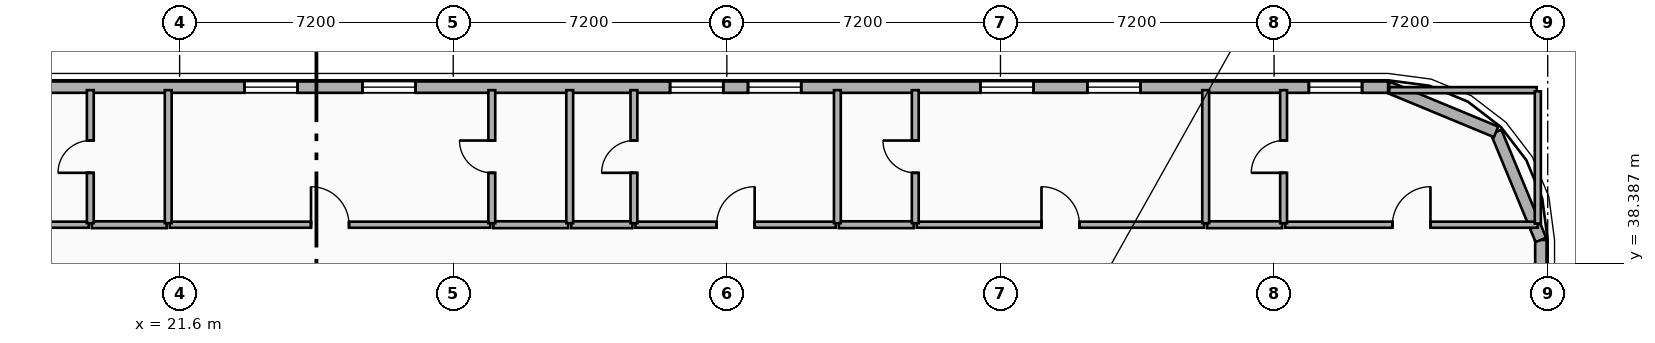
"""IFC4 building model, lengths in metres.
Left out: names, types, materials, properties, quantities, classifications, styles, units other than length and angle.
Written with IfcOpenShell. Run it as: python <this file> out.ifc"""

import sys

from ifc_helpers import new_model, si_unit, direction, frame, frame_2d, origin, place, context, subcontext, project, spatial, rectangle, extrude, element, fill, save


model = new_model("IFC4")
c1 = context("Model", 3, precision=1e-05, world=origin(), true_north=direction((0.0, 1.0)))
c2 = subcontext(c1, "Body", "Model", "MODEL_VIEW")
j1 = project(units=[si_unit("LENGTHUNIT", "METRE"), si_unit("PLANEANGLEUNIT", "RADIAN")], contexts=[c1])
p1 = place(None, origin())
s1 = spatial("IfcSite", under=j1, at=p1, CompositionType="ELEMENT")
p2 = place(p1, origin())
s2 = spatial("IfcBuilding", under=s1, at=p2, CompositionType="ELEMENT")
p3 = place(p2, frame((0.0, 0.0, 86.3)))
s3 = spatial("IfcBuildingStorey", under=s2, at=p3, CompositionType="ELEMENT", Elevation=86.3)
p4 = place(p3, frame((57.42, 39.0, 0.0), z_axis=(0.0, 0.0, 1.0), x_axis=(0.0, -1.0, 0.0)))
e1 = element("IfcWall", 1, at=p4, inside=s3, PredefinedType="SOLIDWALL", context=c2, shape_type="SweptSolid", body=[
    extrude(rectangle(XDim=18.0, YDim=0.3, at=frame_2d((9.0, 0.0))), origin(), (0.0, 0.0, 1.0), 3.24),
])
p5 = place(p4, frame((8.882, 0.0, 0.48)))
e2 = element("IfcOpeningElement", 2, at=p5, cuts=e1, PredefinedType="OPENING", context=c2, shape_type="SweptSolid", body=[
    extrude(rectangle(XDim=1.4, YDim=1.8, at=frame_2d((0.7, 0.9))), frame((0.0, 0.16, 0.0), z_axis=(0.0, -1.0, 0.0), x_axis=(1.0, 0.0, 0.0)), (0.0, 0.0, 1.0), 0.32),
])
p6 = place(p4, frame((3.621, 0.0, 0.48)))
e3 = element("IfcOpeningElement", 3, at=p6, cuts=e1, PredefinedType="OPENING", context=c2, shape_type="SweptSolid", body=[
    extrude(rectangle(XDim=1.4, YDim=1.8, at=frame_2d((0.7, 0.9))), frame((0.0, 0.16, 0.0), z_axis=(0.0, -1.0, 0.0), x_axis=(1.0, 0.0, 0.0)), (0.0, 0.0, 1.0), 0.32),
])
p7 = place(p4, frame((16.28, 0.0, 0.65)))
e4 = element("IfcOpeningElement", 4, at=p7, cuts=e1, PredefinedType="OPENING", context=c2, shape_type="SweptSolid", body=[
    extrude(rectangle(XDim=1.4, YDim=1.8, at=frame_2d((0.7, 0.9))), frame((0.0, 0.16, 0.0), z_axis=(0.0, -1.0, 0.0), x_axis=(1.0, 0.0, 0.0)), (0.0, 0.0, 1.0), 0.32),
])
p8 = place(p3, frame((56.243, 41.843, 0.0), z_axis=(0.0, 0.0, 1.0), x_axis=(0.382636798336, -0.92389884758, 0.0)))
e5 = element("IfcWall", 5, at=p8, inside=s3, PredefinedType="SOLIDWALL", context=c2, shape_type="SweptSolid", body=[
    extrude(rectangle(XDim=3.077, YDim=0.3, at=frame_2d((1.538, 0.0))), origin(), (0.0, 0.0, 1.0), 3.24),
])
p9 = place(p3, frame((53.4, 43.02, 0.0), z_axis=(0.0, 0.0, 1.0), x_axis=(0.923882414032, -0.382676475685, 0.0)))
e6 = element("IfcWall", 6, at=p9, inside=s3, PredefinedType="SOLIDWALL", context=c2, shape_type="SweptSolid", body=[
    extrude(rectangle(XDim=3.077, YDim=0.3, at=frame_2d((1.539, 0.0))), origin(), (0.0, 0.0, 1.0), 3.24),
])
p10 = place(p3, frame((4.2, 43.02, 0.0), z_axis=(0.0, 0.0, 1.0), x_axis=(1.0, 0.0, 0.0)))
e7 = element("IfcWall", 7, at=p10, inside=s3, PredefinedType="SOLIDWALL", context=c2, shape_type="SweptSolid", body=[
    extrude(rectangle(XDim=49.2, YDim=0.3, at=frame_2d((24.6, 0.0))), origin(), (0.0, 0.0, 1.0), 3.24),
])
p11 = place(p10, frame((9.09, 0.0, 0.85)))
e8 = element("IfcOpeningElement", 8, at=p11, cuts=e7, PredefinedType="OPENING", context=c2, shape_type="SweptSolid", body=[
    extrude(rectangle(XDim=1.4, YDim=1.8, at=frame_2d((0.7, 0.9))), frame((0.0, 0.16, 0.0), z_axis=(0.0, -1.0, 0.0), x_axis=(1.0, 0.0, 0.0)), (0.0, 0.0, 1.0), 0.32),
])
p12 = place(p10, frame((11.92, 0.0, 0.85)))
e9 = element("IfcOpeningElement", 9, at=p12, cuts=e7, PredefinedType="OPENING", context=c2, shape_type="SweptSolid", body=[
    extrude(rectangle(XDim=1.4, YDim=1.8, at=frame_2d((0.7, 0.9))), frame((0.0, 0.16, 0.0), z_axis=(0.0, -1.0, 0.0), x_axis=(1.0, 0.0, 0.0)), (0.0, 0.0, 1.0), 0.32),
])
p13 = place(p10, frame((19.105, 0.0, 0.85)))
e10 = element("IfcOpeningElement", 10, at=p13, cuts=e7, PredefinedType="OPENING", context=c2, shape_type="SweptSolid", body=[
    extrude(rectangle(XDim=1.4, YDim=1.8, at=frame_2d((0.7, 0.9))), frame((0.0, 0.16, 0.0), z_axis=(0.0, -1.0, 0.0), x_axis=(1.0, 0.0, 0.0)), (0.0, 0.0, 1.0), 0.32),
])
p14 = place(p10, frame((22.21, 0.0, 0.85)))
e11 = element("IfcOpeningElement", 11, at=p14, cuts=e7, PredefinedType="OPENING", context=c2, shape_type="SweptSolid", body=[
    extrude(rectangle(XDim=1.4, YDim=1.8, at=frame_2d((0.7, 0.9))), frame((0.0, 0.16, 0.0), z_axis=(0.0, -1.0, 0.0), x_axis=(1.0, 0.0, 0.0)), (0.0, 0.0, 1.0), 0.32),
])
p15 = place(p10, frame((30.306, 0.0, 0.85)))
e12 = element("IfcOpeningElement", 12, at=p15, cuts=e7, PredefinedType="OPENING", context=c2, shape_type="SweptSolid", body=[
    extrude(rectangle(XDim=1.4, YDim=1.8, at=frame_2d((0.7, 0.9))), frame((0.0, 0.16, 0.0), z_axis=(0.0, -1.0, 0.0), x_axis=(1.0, 0.0, 0.0)), (0.0, 0.0, 1.0), 0.32),
])
p16 = place(p10, frame((32.357, 0.0, 0.85)))
e13 = element("IfcOpeningElement", 13, at=p16, cuts=e7, PredefinedType="OPENING", context=c2, shape_type="SweptSolid", body=[
    extrude(rectangle(XDim=1.4, YDim=1.8, at=frame_2d((0.7, 0.9))), frame((0.0, 0.16, 0.0), z_axis=(0.0, -1.0, 0.0), x_axis=(1.0, 0.0, 0.0)), (0.0, 0.0, 1.0), 0.32),
])
p17 = place(p10, frame((38.472, 0.0, 0.85)))
e14 = element("IfcOpeningElement", 14, at=p17, cuts=e7, PredefinedType="OPENING", context=c2, shape_type="SweptSolid", body=[
    extrude(rectangle(XDim=1.4, YDim=1.8, at=frame_2d((0.7, 0.9))), frame((0.0, 0.16, 0.0), z_axis=(0.0, -1.0, 0.0), x_axis=(1.0, 0.0, 0.0)), (0.0, 0.0, 1.0), 0.32),
])
p18 = place(p10, frame((41.286, 0.0, 0.85)))
e15 = element("IfcOpeningElement", 15, at=p18, cuts=e7, PredefinedType="OPENING", context=c2, shape_type="SweptSolid", body=[
    extrude(rectangle(XDim=1.4, YDim=1.8, at=frame_2d((0.7, 0.9))), frame((0.0, 0.16, 0.0), z_axis=(0.0, -1.0, 0.0), x_axis=(1.0, 0.0, 0.0)), (0.0, 0.0, 1.0), 0.32),
])
p19 = place(p10, frame((47.115, 0.0, 0.85)))
e16 = element("IfcOpeningElement", 16, at=p19, cuts=e7, PredefinedType="OPENING", context=c2, shape_type="SweptSolid", body=[
    extrude(rectangle(XDim=1.4, YDim=1.8, at=frame_2d((0.7, 0.9))), frame((0.0, 0.16, 0.0), z_axis=(0.0, -1.0, 0.0), x_axis=(1.0, 0.0, 0.0)), (0.0, 0.0, 1.0), 0.32),
])
p20 = place(p3, frame((11.6, 39.4, 0.0), z_axis=(0.0, 0.0, 1.0), x_axis=(1.0, 0.0, 0.0)))
e17 = element("IfcWall", 17, at=p20, inside=s3, PredefinedType="PARTITIONING", context=c2, shape_type="SweptSolid", body=[
    extrude(rectangle(XDim=7.61, YDim=0.16, at=frame_2d((3.805, 0.0))), origin(), (0.0, 0.0, 1.0), 3.24),
])
p21 = place(p20, frame((3.305, 0.0, 0.0)))
e18 = element("IfcOpeningElement", 18, at=p21, cuts=e17, PredefinedType="OPENING", context=c2, shape_type="SweptSolid", body=[
    extrude(rectangle(XDim=1.0, YDim=2.15, at=frame_2d((0.5, 1.075))), frame((0.0, 0.09, 0.0), z_axis=(0.0, -1.0, 0.0), x_axis=(1.0, 0.0, 0.0)), (0.0, 0.0, 1.0), 0.18),
])
p22 = place(p3, frame((19.29, 39.4, 0.0), z_axis=(0.0, 0.0, 1.0), x_axis=(1.0, 0.0, 0.0)))
e19 = element("IfcWall", 19, at=p22, inside=s3, PredefinedType="PLUMBINGWALL", context=c2, shape_type="SweptSolid", body=[
    extrude(rectangle(XDim=1.97, YDim=0.18, at=frame_2d((0.985, 0.0))), origin(), (0.0, 0.0, 1.0), 3.24),
])
p23 = place(p3, frame((21.34, 39.4, 0.0), z_axis=(0.0, 0.0, 1.0), x_axis=(1.0, 0.0, 0.0)))
e20 = element("IfcWall", 20, at=p23, inside=s3, PredefinedType="PARTITIONING", context=c2, shape_type="SweptSolid", body=[
    extrude(rectangle(XDim=8.435, YDim=0.16, at=frame_2d((4.217, 0.0))), origin(), (0.0, 0.0, 1.0), 3.24),
])
p24 = place(p23, frame((3.718, 0.0, 0.0)))
e21 = element("IfcOpeningElement", 21, at=p24, cuts=e20, PredefinedType="OPENING", context=c2, shape_type="SweptSolid", body=[
    extrude(rectangle(XDim=1.0, YDim=2.15, at=frame_2d((0.5, 1.075))), frame((0.0, 0.09, 0.0), z_axis=(0.0, -1.0, 0.0), x_axis=(1.0, 0.0, 0.0)), (0.0, 0.0, 1.0), 0.18),
])
p25 = place(p3, frame((29.855, 39.4, 0.0), z_axis=(0.0, 0.0, 1.0), x_axis=(1.0, 0.0, 0.0)))
e22 = element("IfcWall", 22, at=p25, inside=s3, PredefinedType="PLUMBINGWALL", context=c2, shape_type="SweptSolid", body=[
    extrude(rectangle(XDim=1.97, YDim=0.18, at=frame_2d((0.985, 0.0))), origin(), (0.0, 0.0, 1.0), 3.24),
])
p26 = place(p3, frame((33.595, 39.4, 0.0), z_axis=(0.0, 0.0, 1.0), x_axis=(1.0, 0.0, 0.0)))
e23 = element("IfcWall", 23, at=p26, inside=s3, PredefinedType="PARTITIONING", context=c2, shape_type="SweptSolid", body=[
    extrude(rectangle(XDim=5.273, YDim=0.16, at=frame_2d((2.636, 0.0))), origin(), (0.0, 0.0, 1.0), 3.24),
])
p27 = place(p26, frame((2.136, 0.0, 0.0)))
e24 = element("IfcOpeningElement", 24, at=p27, cuts=e23, PredefinedType="OPENING", context=c2, shape_type="SweptSolid", body=[
    extrude(rectangle(XDim=1.0, YDim=2.15, at=frame_2d((0.5, 1.075))), frame((0.0, 0.09, 0.0), z_axis=(0.0, -1.0, 0.0), x_axis=(1.0, 0.0, 0.0)), (0.0, 0.0, 1.0), 0.18),
])
p28 = place(p3, frame((31.905, 39.4, 0.0), z_axis=(0.0, 0.0, 1.0), x_axis=(1.0, 0.0, 0.0)))
e25 = element("IfcWall", 25, at=p28, inside=s3, PredefinedType="PLUMBINGWALL", context=c2, shape_type="SweptSolid", body=[
    extrude(rectangle(XDim=1.61, YDim=0.18, at=frame_2d((0.805, 0.0))), origin(), (0.0, 0.0, 1.0), 3.24),
])
p29 = place(p3, frame((40.998, 39.4, 0.0), z_axis=(0.0, 0.0, 1.0), x_axis=(1.0, 0.0, 0.0)))
e26 = element("IfcWall", 26, at=p29, inside=s3, PredefinedType="PARTITIONING", context=c2, shape_type="SweptSolid", body=[
    extrude(rectangle(XDim=7.562, YDim=0.16, at=frame_2d((3.781, 0.0))), origin(), (0.0, 0.0, 1.0), 3.24),
])
p30 = place(p29, frame((3.281, 0.0, 0.0)))
e27 = element("IfcOpeningElement", 27, at=p30, cuts=e26, PredefinedType="OPENING", context=c2, shape_type="SweptSolid", body=[
    extrude(rectangle(XDim=1.0, YDim=2.15, at=frame_2d((0.5, 1.075))), frame((0.0, 0.09, 0.0), z_axis=(0.0, -1.0, 0.0), x_axis=(1.0, 0.0, 0.0)), (0.0, 0.0, 1.0), 0.18),
])
p31 = place(p3, frame((38.948, 39.4, 0.0), z_axis=(0.0, 0.0, 1.0), x_axis=(1.0, 0.0, 0.0)))
e28 = element("IfcWall", 28, at=p31, inside=s3, PredefinedType="PLUMBINGWALL", context=c2, shape_type="SweptSolid", body=[
    extrude(rectangle(XDim=1.97, YDim=0.18, at=frame_2d((0.985, 0.0))), origin(), (0.0, 0.0, 1.0), 3.24),
])
p32 = place(p3, frame((50.69, 39.4, 0.0), z_axis=(0.0, 0.0, 1.0), x_axis=(1.0, 0.0, 0.0)))
e29 = element("IfcWall", 29, at=p32, inside=s3, PredefinedType="PARTITIONING", context=c2, shape_type="SweptSolid", body=[
    extrude(rectangle(XDim=6.65, YDim=0.16, at=frame_2d((3.325, 0.0))), origin(), (0.0, 0.0, 1.0), 3.24),
])
p33 = place(p32, frame((2.825, 0.0, 0.0)))
e30 = element("IfcOpeningElement", 30, at=p33, cuts=e29, PredefinedType="OPENING", context=c2, shape_type="SweptSolid", body=[
    extrude(rectangle(XDim=1.0, YDim=2.15, at=frame_2d((0.5, 1.075))), frame((0.0, 0.09, 0.0), z_axis=(0.0, -1.0, 0.0), x_axis=(1.0, 0.0, 0.0)), (0.0, 0.0, 1.0), 0.18),
])
p34 = place(p3, frame((48.64, 39.4, 0.0), z_axis=(0.0, 0.0, 1.0), x_axis=(1.0, 0.0, 0.0)))
e31 = element("IfcWall", 31, at=p34, inside=s3, PredefinedType="PLUMBINGWALL", context=c2, shape_type="SweptSolid", body=[
    extrude(rectangle(XDim=1.97, YDim=0.18, at=frame_2d((0.985, 0.0))), origin(), (0.0, 0.0, 1.0), 3.24),
])
p35 = place(p3, frame((19.25, 39.44, 0.0), z_axis=(0.0, 0.0, 1.0), x_axis=(0.0, 1.0, 0.0)))
e32 = element("IfcWall", 32, at=p35, inside=s3, PredefinedType="PLUMBINGWALL", context=c2, shape_type="SweptSolid", body=[
    extrude(rectangle(XDim=3.5, YDim=0.18, at=frame_2d((1.75, 0.0))), origin(), (0.0, 0.0, 1.0), 3.24),
])
p36 = place(p35, frame((1.325, 0.0, 0.0)))
e33 = element("IfcOpeningElement", 33, at=p36, cuts=e32, PredefinedType="OPENING", context=c2, shape_type="SweptSolid", body=[
    extrude(rectangle(XDim=0.85, YDim=2.1, at=frame_2d((0.425, 1.05))), frame((0.0, 0.1, 0.0), z_axis=(0.0, -1.0, 0.0), x_axis=(1.0, 0.0, 0.0)), (0.0, 0.0, 1.0), 0.2),
])
p37 = place(p3, frame((21.3, 39.44, 0.0), z_axis=(0.0, 0.0, 1.0), x_axis=(0.0, 1.0, 0.0)))
e34 = element("IfcWall", 34, at=p37, inside=s3, PredefinedType="PLUMBINGWALL", context=c2, shape_type="SweptSolid", body=[
    extrude(rectangle(XDim=3.5, YDim=0.18, at=frame_2d((1.75, 0.0))), origin(), (0.0, 0.0, 1.0), 3.24),
])
p38 = place(p3, frame((29.815, 39.44, 0.0), z_axis=(0.0, 0.0, 1.0), x_axis=(0.0, 1.0, 0.0)))
e35 = element("IfcWall", 35, at=p38, inside=s3, PredefinedType="PLUMBINGWALL", context=c2, shape_type="SweptSolid", body=[
    extrude(rectangle(XDim=3.5, YDim=0.18, at=frame_2d((1.75, 0.0))), origin(), (0.0, 0.0, 1.0), 3.24),
])
p39 = place(p38, frame((1.325, 0.0, 0.0)))
e36 = element("IfcOpeningElement", 36, at=p39, cuts=e35, PredefinedType="OPENING", context=c2, shape_type="SweptSolid", body=[
    extrude(rectangle(XDim=0.85, YDim=2.1, at=frame_2d((0.425, 1.05))), frame((0.0, 0.1, 0.0), z_axis=(0.0, -1.0, 0.0), x_axis=(1.0, 0.0, 0.0)), (0.0, 0.0, 1.0), 0.2),
])
p40 = place(p3, frame((31.865, 39.44, 0.0), z_axis=(0.0, 0.0, 1.0), x_axis=(0.0, 1.0, 0.0)))
e37 = element("IfcWall", 37, at=p40, inside=s3, PredefinedType="PLUMBINGWALL", context=c2, shape_type="SweptSolid", body=[
    extrude(rectangle(XDim=3.5, YDim=0.18, at=frame_2d((1.75, 0.0))), origin(), (0.0, 0.0, 1.0), 3.24),
])
p41 = place(p3, frame((33.555, 39.44, 0.0), z_axis=(0.0, 0.0, 1.0), x_axis=(0.0, 1.0, 0.0)))
e38 = element("IfcWall", 38, at=p41, inside=s3, PredefinedType="PLUMBINGWALL", context=c2, shape_type="SweptSolid", body=[
    extrude(rectangle(XDim=3.5, YDim=0.18, at=frame_2d((1.75, 0.0))), origin(), (0.0, 0.0, 1.0), 3.24),
])
p42 = place(p41, frame((1.325, 0.0, 0.0)))
e39 = element("IfcOpeningElement", 39, at=p42, cuts=e38, PredefinedType="OPENING", context=c2, shape_type="SweptSolid", body=[
    extrude(rectangle(XDim=0.85, YDim=2.1, at=frame_2d((0.425, 1.05))), frame((0.0, 0.1, 0.0), z_axis=(0.0, -1.0, 0.0), x_axis=(1.0, 0.0, 0.0)), (0.0, 0.0, 1.0), 0.2),
])
p43 = place(p3, frame((38.908, 39.44, 0.0), z_axis=(0.0, 0.0, 1.0), x_axis=(0.0, 1.0, 0.0)))
e40 = element("IfcWall", 40, at=p43, inside=s3, PredefinedType="PLUMBINGWALL", context=c2, shape_type="SweptSolid", body=[
    extrude(rectangle(XDim=3.5, YDim=0.18, at=frame_2d((1.75, 0.0))), origin(), (0.0, 0.0, 1.0), 3.24),
])
p44 = place(p3, frame((40.958, 39.44, 0.0), z_axis=(0.0, 0.0, 1.0), x_axis=(0.0, 1.0, 0.0)))
e41 = element("IfcWall", 41, at=p44, inside=s3, PredefinedType="PLUMBINGWALL", context=c2, shape_type="SweptSolid", body=[
    extrude(rectangle(XDim=3.5, YDim=0.18, at=frame_2d((1.75, 0.0))), origin(), (0.0, 0.0, 1.0), 3.24),
])
p45 = place(p44, frame((1.325, 0.0, 0.0)))
e42 = element("IfcOpeningElement", 42, at=p45, cuts=e41, PredefinedType="OPENING", context=c2, shape_type="SweptSolid", body=[
    extrude(rectangle(XDim=0.85, YDim=2.1, at=frame_2d((0.425, 1.05))), frame((0.0, 0.1, 0.0), z_axis=(0.0, -1.0, 0.0), x_axis=(1.0, 0.0, 0.0)), (0.0, 0.0, 1.0), 0.2),
])
p46 = place(p3, frame((48.6, 39.44, 0.0), z_axis=(0.0, 0.0, 1.0), x_axis=(0.0, 1.0, 0.0)))
e43 = element("IfcWall", 43, at=p46, inside=s3, PredefinedType="PLUMBINGWALL", context=c2, shape_type="SweptSolid", body=[
    extrude(rectangle(XDim=3.5, YDim=0.18, at=frame_2d((1.75, 0.0))), origin(), (0.0, 0.0, 1.0), 3.24),
])
p47 = place(p3, frame((50.65, 39.44, 0.0), z_axis=(0.0, 0.0, 1.0), x_axis=(0.0, 1.0, 0.0)))
e44 = element("IfcWall", 44, at=p47, inside=s3, PredefinedType="PLUMBINGWALL", context=c2, shape_type="SweptSolid", body=[
    extrude(rectangle(XDim=3.5, YDim=0.18, at=frame_2d((1.75, 0.0))), origin(), (0.0, 0.0, 1.0), 3.24),
])
p48 = place(p47, frame((1.325, 0.0, 0.0)))
e45 = element("IfcOpeningElement", 45, at=p48, cuts=e44, PredefinedType="OPENING", context=c2, shape_type="SweptSolid", body=[
    extrude(rectangle(XDim=0.85, YDim=2.1, at=frame_2d((0.425, 1.05))), frame((0.0, 0.1, 0.0), z_axis=(0.0, -1.0, 0.0), x_axis=(1.0, 0.0, 0.0)), (0.0, 0.0, 1.0), 0.2),
])
p49 = place(p3, frame((53.43, 42.94, 0.0), z_axis=(0.0, 0.0, 1.0), x_axis=(1.0, 0.0, 0.0)))
e46 = element("IfcWall", 46, at=p49, inside=s3, PredefinedType="PARTITIONING", context=c2, shape_type="SweptSolid", body=[
    extrude(rectangle(XDim=3.88, YDim=0.16, at=frame_2d((1.94, 0.0))), origin(), (0.0, 0.0, 1.0), 3.24),
])
p50 = place(p3, frame((57.34, 39.43, 0.0), z_axis=(0.0, 0.0, 1.0), x_axis=(0.0, 1.0, 0.0)))
e47 = element("IfcWall", 47, at=p50, inside=s3, PredefinedType="PARTITIONING", context=c2, shape_type="SweptSolid", body=[
    extrude(rectangle(XDim=3.48, YDim=0.16, at=frame_2d((1.74, 0.0))), origin(), (0.0, 0.0, 1.0), 3.24),
])
p51 = place(p13, origin())
e48 = element("IfcWindow", 48, at=p51, inside=s3, PartitioningType="SINGLE_PANEL", PredefinedType="WINDOW", context=c2, shape_type="SweptSolid", body=[
    extrude(rectangle(XDim=1.4, YDim=1.8, at=frame_2d((0.7, 0.9))), frame((0.0, 0.03, 0.0), z_axis=(0.0, -1.0, 0.0), x_axis=(1.0, 0.0, 0.0)), (0.0, 0.0, 1.0), 0.06),
])
fill(e10, e48)
p52 = place(p14, origin())
e49 = element("IfcWindow", 49, at=p52, inside=s3, PartitioningType="SINGLE_PANEL", PredefinedType="WINDOW", context=c2, shape_type="SweptSolid", body=[
    extrude(rectangle(XDim=1.4, YDim=1.8, at=frame_2d((0.7, 0.9))), frame((0.0, 0.03, 0.0), z_axis=(0.0, -1.0, 0.0), x_axis=(1.0, 0.0, 0.0)), (0.0, 0.0, 1.0), 0.06),
])
fill(e11, e49)
p53 = place(p15, origin())
e50 = element("IfcWindow", 50, at=p53, inside=s3, PartitioningType="SINGLE_PANEL", PredefinedType="WINDOW", context=c2, shape_type="SweptSolid", body=[
    extrude(rectangle(XDim=1.4, YDim=1.8, at=frame_2d((0.7, 0.9))), frame((0.0, 0.03, 0.0), z_axis=(0.0, -1.0, 0.0), x_axis=(1.0, 0.0, 0.0)), (0.0, 0.0, 1.0), 0.06),
])
fill(e12, e50)
p54 = place(p16, origin())
e51 = element("IfcWindow", 51, at=p54, inside=s3, PartitioningType="SINGLE_PANEL", PredefinedType="WINDOW", context=c2, shape_type="SweptSolid", body=[
    extrude(rectangle(XDim=1.4, YDim=1.8, at=frame_2d((0.7, 0.9))), frame((0.0, 0.03, 0.0), z_axis=(0.0, -1.0, 0.0), x_axis=(1.0, 0.0, 0.0)), (0.0, 0.0, 1.0), 0.06),
])
fill(e13, e51)
p55 = place(p17, origin())
e52 = element("IfcWindow", 52, at=p55, inside=s3, PartitioningType="SINGLE_PANEL", PredefinedType="WINDOW", context=c2, shape_type="SweptSolid", body=[
    extrude(rectangle(XDim=1.4, YDim=1.8, at=frame_2d((0.7, 0.9))), frame((0.0, 0.03, 0.0), z_axis=(0.0, -1.0, 0.0), x_axis=(1.0, 0.0, 0.0)), (0.0, 0.0, 1.0), 0.06),
])
fill(e14, e52)
p56 = place(p18, origin())
e53 = element("IfcWindow", 53, at=p56, inside=s3, PartitioningType="SINGLE_PANEL", PredefinedType="WINDOW", context=c2, shape_type="SweptSolid", body=[
    extrude(rectangle(XDim=1.4, YDim=1.8, at=frame_2d((0.7, 0.9))), frame((0.0, 0.03, 0.0), z_axis=(0.0, -1.0, 0.0), x_axis=(1.0, 0.0, 0.0)), (0.0, 0.0, 1.0), 0.06),
])
fill(e15, e53)
p57 = place(p19, origin())
e54 = element("IfcWindow", 54, at=p57, inside=s3, PartitioningType="SINGLE_PANEL", PredefinedType="WINDOW", context=c2, shape_type="SweptSolid", body=[
    extrude(rectangle(XDim=1.4, YDim=1.8, at=frame_2d((0.7, 0.9))), frame((0.0, 0.03, 0.0), z_axis=(0.0, -1.0, 0.0), x_axis=(1.0, 0.0, 0.0)), (0.0, 0.0, 1.0), 0.06),
])
fill(e16, e54)
p58 = place(p24, origin())
e55 = element("IfcDoor", 55, at=p58, inside=s3, OperationType="SINGLE_SWING_LEFT", PredefinedType="DOOR", context=c2, shape_type="SweptSolid", body=[
    extrude(rectangle(XDim=1.0, YDim=2.15, at=frame_2d((0.5, 1.075))), frame((0.0, 0.025, 0.0), z_axis=(0.0, -1.0, 0.0), x_axis=(1.0, 0.0, 0.0)), (0.0, 0.0, 1.0), 0.05),
])
fill(e21, e55)
p59 = place(p27, origin())
e56 = element("IfcDoor", 56, at=p59, inside=s3, OperationType="SINGLE_SWING_RIGHT", PredefinedType="DOOR", context=c2, shape_type="SweptSolid", body=[
    extrude(rectangle(XDim=1.0, YDim=2.15, at=frame_2d((0.5, 1.075))), frame((0.0, 0.025, 0.0), z_axis=(0.0, -1.0, 0.0), x_axis=(1.0, 0.0, 0.0)), (0.0, 0.0, 1.0), 0.05),
])
fill(e24, e56)
p60 = place(p30, origin())
e57 = element("IfcDoor", 57, at=p60, inside=s3, OperationType="SINGLE_SWING_LEFT", PredefinedType="DOOR", context=c2, shape_type="SweptSolid", body=[
    extrude(rectangle(XDim=1.0, YDim=2.15, at=frame_2d((0.5, 1.075))), frame((0.0, 0.025, 0.0), z_axis=(0.0, -1.0, 0.0), x_axis=(1.0, 0.0, 0.0)), (0.0, 0.0, 1.0), 0.05),
])
fill(e27, e57)
p61 = place(p33, origin())
e58 = element("IfcDoor", 58, at=p61, inside=s3, OperationType="SINGLE_SWING_RIGHT", PredefinedType="DOOR", context=c2, shape_type="SweptSolid", body=[
    extrude(rectangle(XDim=1.0, YDim=2.15, at=frame_2d((0.5, 1.075))), frame((0.0, 0.025, 0.0), z_axis=(0.0, -1.0, 0.0), x_axis=(1.0, 0.0, 0.0)), (0.0, 0.0, 1.0), 0.05),
])
fill(e30, e58)
p62 = place(p36, origin())
e59 = element("IfcDoor", 59, at=p62, inside=s3, OperationType="SINGLE_SWING_LEFT", PredefinedType="DOOR", context=c2, shape_type="SweptSolid", body=[
    extrude(rectangle(XDim=0.85, YDim=2.1, at=frame_2d((0.425, 1.05))), frame((0.0, 0.025, 0.0), z_axis=(0.0, -1.0, 0.0), x_axis=(1.0, 0.0, 0.0)), (0.0, 0.0, 1.0), 0.05),
])
fill(e33, e59)
p63 = place(p39, origin())
e60 = element("IfcDoor", 60, at=p63, inside=s3, OperationType="SINGLE_SWING_RIGHT", PredefinedType="DOOR", context=c2, shape_type="SweptSolid", body=[
    extrude(rectangle(XDim=0.85, YDim=2.1, at=frame_2d((0.425, 1.05))), frame((0.0, 0.025, 0.0), z_axis=(0.0, -1.0, 0.0), x_axis=(1.0, 0.0, 0.0)), (0.0, 0.0, 1.0), 0.05),
])
fill(e36, e60)
p64 = place(p42, origin())
e61 = element("IfcDoor", 61, at=p64, inside=s3, OperationType="SINGLE_SWING_LEFT", PredefinedType="DOOR", context=c2, shape_type="SweptSolid", body=[
    extrude(rectangle(XDim=0.85, YDim=2.1, at=frame_2d((0.425, 1.05))), frame((0.0, 0.025, 0.0), z_axis=(0.0, -1.0, 0.0), x_axis=(1.0, 0.0, 0.0)), (0.0, 0.0, 1.0), 0.05),
])
fill(e39, e61)
p65 = place(p45, origin())
e62 = element("IfcDoor", 62, at=p65, inside=s3, OperationType="SINGLE_SWING_RIGHT", PredefinedType="DOOR", context=c2, shape_type="SweptSolid", body=[
    extrude(rectangle(XDim=0.85, YDim=2.1, at=frame_2d((0.425, 1.05))), frame((0.0, 0.025, 0.0), z_axis=(0.0, -1.0, 0.0), x_axis=(1.0, 0.0, 0.0)), (0.0, 0.0, 1.0), 0.05),
])
fill(e42, e62)
p66 = place(p48, origin())
e63 = element("IfcDoor", 63, at=p66, inside=s3, OperationType="SINGLE_SWING_LEFT", PredefinedType="DOOR", context=c2, shape_type="SweptSolid", body=[
    extrude(rectangle(XDim=0.85, YDim=2.1, at=frame_2d((0.425, 1.05))), frame((0.0, 0.025, 0.0), z_axis=(0.0, -1.0, 0.0), x_axis=(1.0, 0.0, 0.0)), (0.0, 0.0, 1.0), 0.05),
])
fill(e45, e63)
save(model, sys.argv[1])
